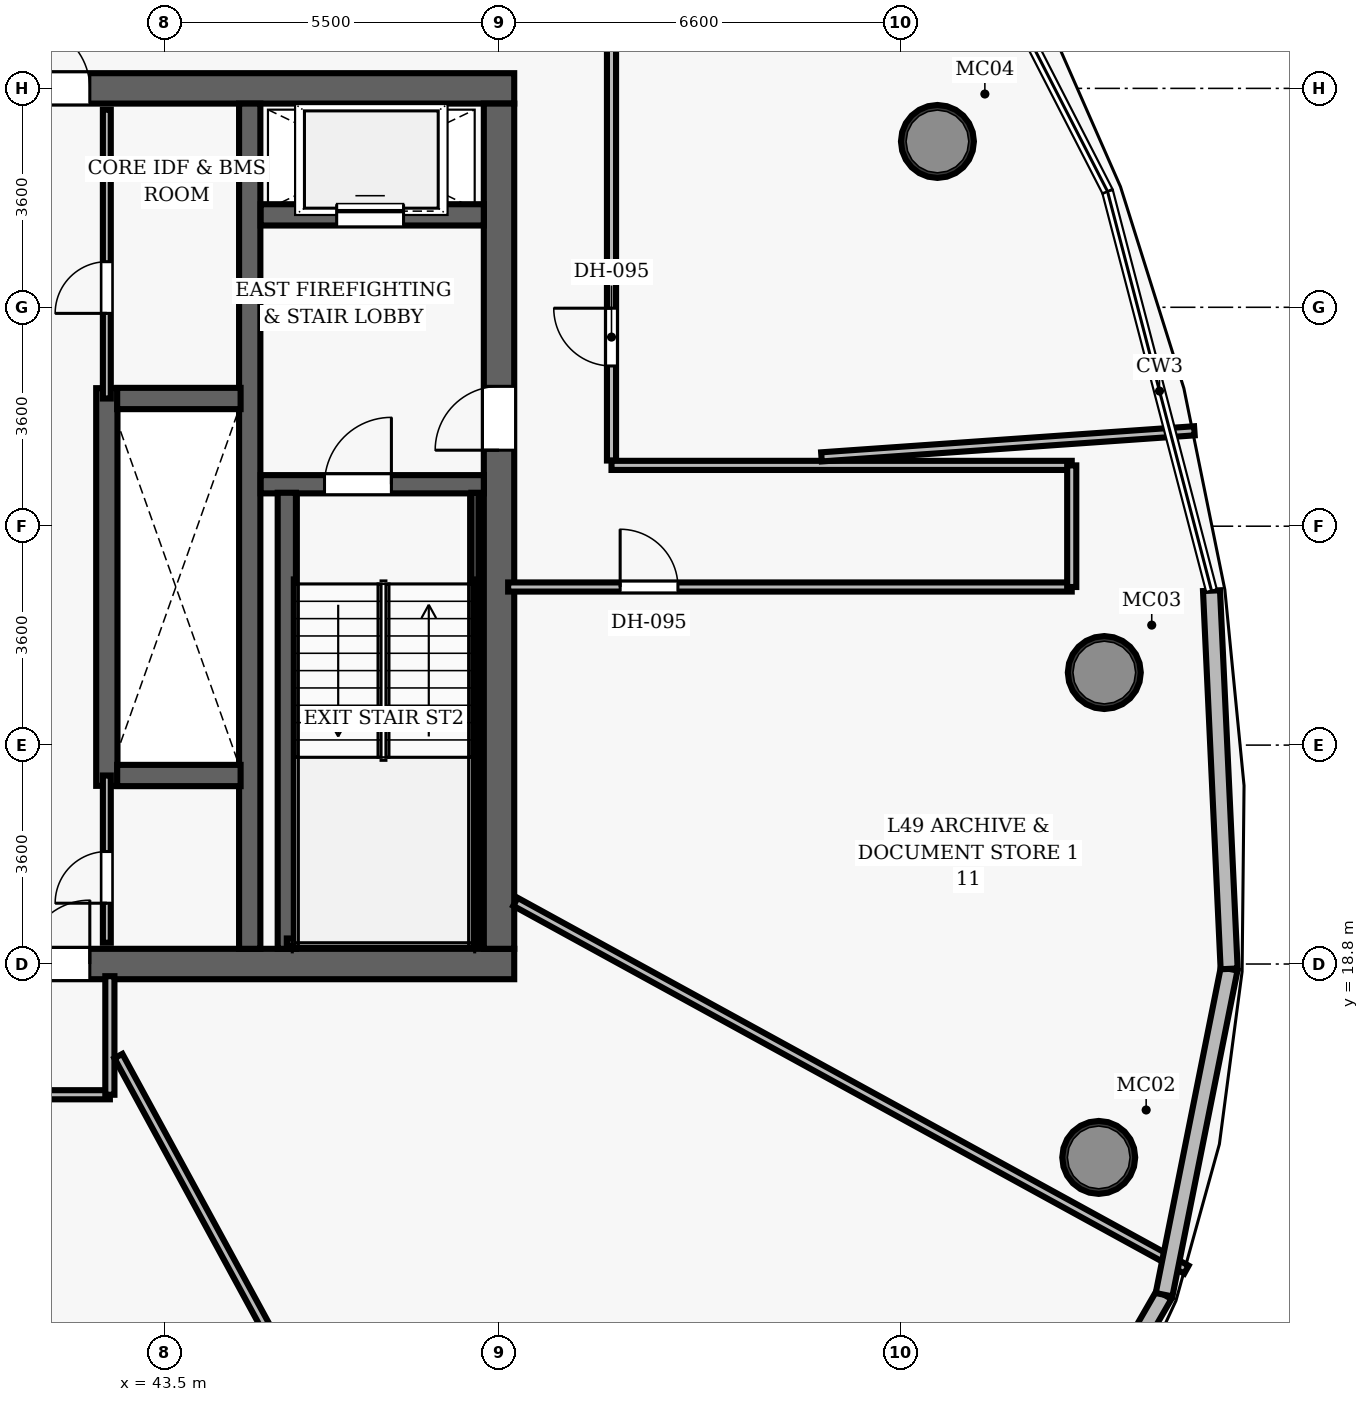
"""IFC4 building model, lengths in metres.
Left out: names, types, materials, properties, quantities, classifications, styles, units other than length and angle.
Written with IfcOpenShell. Run it as: python <this file> out.ifc"""

import sys

from ifc_helpers import new_model, si_unit, direction, frame, frame_2d, origin, origin_2d, place, context, subcontext, project, spatial, rectangle, hollow_circle, extrude, element, fill, save


model = new_model("IFC4")
c1 = context("Model", 3, precision=1e-05, world=origin(), true_north=direction((0.0, 1.0)))
c2 = subcontext(c1, "Body", "Model", "MODEL_VIEW")
j1 = project(units=[si_unit("LENGTHUNIT", "METRE"), si_unit("PLANEANGLEUNIT", "RADIAN")], contexts=[c1])
p1 = place(None, origin())
s1 = spatial("IfcSite", under=j1, at=p1, CompositionType="ELEMENT")
p2 = place(p1, origin())
s2 = spatial("IfcBuilding", under=s1, at=p2, CompositionType="ELEMENT")
p3 = place(p2, frame((0.0, 0.0, 194.3)))
s3 = spatial("IfcBuildingStorey", under=s2, at=p3, CompositionType="ELEMENT", Elevation=194.3)
p4 = place(p3, frame((26.75, 18.8, 0.0), z_axis=(0.0, 0.0, 1.0), x_axis=(1.0, 0.0, 0.0)))
e1 = element("IfcWall", 1, at=p4, inside=s3, PredefinedType="SHEAR", context=c2, shape_type="SweptSolid", body=[
    extrude(rectangle(XDim=22.5, YDim=0.5, at=frame_2d((11.25, 0.0))), origin(), (0.0, 0.0, 1.0), 3.85),
])
p5 = place(p4, frame((14.47, 0.0, 0.0)))
e2 = element("IfcOpeningElement", 2, at=p5, cuts=e1, PredefinedType="OPENING", context=c2, shape_type="SweptSolid", body=[
    extrude(rectangle(XDim=1.05, YDim=2.15, at=frame_2d((0.525, 1.075))), frame((0.0, 0.26, 0.0), z_axis=(0.0, -1.0, 0.0), x_axis=(1.0, 0.0, 0.0)), (0.0, 0.0, 1.0), 0.52),
])
p6 = place(p3, frame((26.75, 33.2, 0.0), z_axis=(0.0, 0.0, 1.0), x_axis=(1.0, 0.0, 0.0)))
e3 = element("IfcWall", 3, at=p6, inside=s3, PredefinedType="SHEAR", context=c2, shape_type="SweptSolid", body=[
    extrude(rectangle(XDim=22.5, YDim=0.5, at=frame_2d((11.25, 0.0))), origin(), (0.0, 0.0, 1.0), 3.85),
])
p7 = place(p6, frame((4.57, 0.0, 0.0)))
e4 = element("IfcOpeningElement", 4, at=p7, cuts=e3, PredefinedType="OPENING", context=c2, shape_type="SweptSolid", body=[
    extrude(rectangle(XDim=1.05, YDim=2.15, at=frame_2d((0.525, 1.075))), frame((0.0, 0.26, 0.0), z_axis=(0.0, -1.0, 0.0), x_axis=(1.0, 0.0, 0.0)), (0.0, 0.0, 1.0), 0.52),
])
p8 = place(p6, frame((14.47, 0.0, 0.0)))
e5 = element("IfcOpeningElement", 5, at=p8, cuts=e3, PredefinedType="OPENING", context=c2, shape_type="SweptSolid", body=[
    extrude(rectangle(XDim=1.05, YDim=2.15, at=frame_2d((0.525, 1.075))), frame((0.0, 0.26, 0.0), z_axis=(0.0, -1.0, 0.0), x_axis=(1.0, 0.0, 0.0)), (0.0, 0.0, 1.0), 0.52),
])
p9 = place(p3, frame((49.0, 19.05, 0.0), z_axis=(0.0, 0.0, 1.0), x_axis=(0.0, 1.0, 0.0)))
e6 = element("IfcWall", 6, at=p9, inside=s3, PredefinedType="SHEAR", context=c2, shape_type="SweptSolid", body=[
    extrude(rectangle(XDim=13.9, YDim=0.5, at=frame_2d((6.95, 0.0))), origin(), (0.0, 0.0, 1.0), 3.85),
])
p10 = place(p9, frame((8.2, 0.0, 0.0)))
e7 = element("IfcOpeningElement", 7, at=p10, cuts=e6, PredefinedType="OPENING", context=c2, shape_type="SweptSolid", body=[
    extrude(rectangle(XDim=1.05, YDim=2.15, at=frame_2d((0.525, 1.075))), frame((0.0, 0.26, 0.0), z_axis=(0.0, -1.0, 0.0), x_axis=(1.0, 0.0, 0.0)), (0.0, 0.0, 1.0), 0.52),
])
p11 = place(p3, frame((44.9, 19.05, 0.0), z_axis=(0.0, 0.0, 1.0), x_axis=(0.0, 1.0, 0.0)))
e8 = element("IfcWall", 8, at=p11, inside=s3, PredefinedType="SHEAR", context=c2, shape_type="SweptSolid", body=[
    extrude(rectangle(XDim=13.9, YDim=0.35, at=frame_2d((6.95, 0.0))), origin(), (0.0, 0.0, 1.0), 3.85),
])
for number, where, z_axis, x_axis in (
    (9, (58.863, 15.619, 0.0), (0.0, 0.0, 1.0), (1.0, 0.0, 0.0)),
    (10, (58.955, 23.594, 0.0), (0.0, 0.0, 1.0), (1.0, 0.0, 0.0)),
    (11, (56.21, 32.327, 0.0), (0.0, 0.0, 1.0), (1.0, 0.0, 0.0)),
):
    element("IfcColumn", number, at=place(p3, frame(where, z_axis=z_axis, x_axis=x_axis)), inside=s3, PredefinedType="COLUMN", context=c2, shape_type="SweptSolid", body=[
        extrude(hollow_circle(Radius=0.6, WallThickness=0.05, at=origin_2d()), origin(), (0.0, 0.0, 1.0), 3.85),
    ])
p12 = place(p3, frame((45.08, 26.69, 0.0), z_axis=(0.0, 0.0, 1.0), x_axis=(1.0, 0.0, 0.0)))
e12 = element("IfcWall", 12, at=p12, inside=s3, PredefinedType="SHEAR", context=c2, shape_type="SweptSolid", body=[
    extrude(rectangle(XDim=3.67, YDim=0.3, at=frame_2d((1.835, 0.0))), origin(), (0.0, 0.0, 1.0), 3.85),
])
p13 = place(p12, frame((1.05, 0.0, 0.0)))
e13 = element("IfcOpeningElement", 13, at=p13, cuts=e12, PredefinedType="OPENING", context=c2, shape_type="SweptSolid", body=[
    extrude(rectangle(XDim=1.1, YDim=2.15, at=frame_2d((0.55, 1.075))), frame((0.0, 0.16, 0.0), z_axis=(0.0, -1.0, 0.0), x_axis=(1.0, 0.0, 0.0)), (0.0, 0.0, 1.0), 0.32),
])
p14 = place(p3, frame((45.51, 19.05, 0.0), z_axis=(0.0, 0.0, 1.0), x_axis=(0.0, 1.0, 0.0)))
e14 = element("IfcWall", 14, at=p14, inside=s3, PredefinedType="SHEAR", context=c2, shape_type="SweptSolid", body=[
    extrude(rectangle(XDim=7.5, YDim=0.3, at=frame_2d((3.75, 0.0))), origin(), (0.0, 0.0, 1.0), 3.85),
])
p15 = place(p3, frame((48.605, 19.1, 0.0), z_axis=(0.0, 0.0, 1.0), x_axis=(0.0, 1.0, 0.0)))
e15 = element("IfcWall", 15, at=p15, inside=s3, PredefinedType="SHEAR", context=c2, shape_type="SweptSolid", body=[
    extrude(rectangle(XDim=7.45, YDim=0.12, at=frame_2d((3.725, 0.0))), origin(), (0.0, 0.0, 1.0), 3.85),
])
p16 = place(p3, frame((45.51, 19.16, 0.0), z_axis=(0.0, 0.0, 1.0), x_axis=(1.0, 0.0, 0.0)))
e16 = element("IfcWall", 16, at=p16, inside=s3, PredefinedType="SHEAR", context=c2, shape_type="SweptSolid", body=[
    extrude(rectangle(XDim=3.095, YDim=0.12, at=frame_2d((1.547, 0.0))), origin(), (0.0, 0.0, 1.0), 3.85),
])
p17 = place(p3, frame((45.08, 31.12, 0.0), z_axis=(0.0, 0.0, 1.0), x_axis=(1.0, 0.0, 0.0)))
e17 = element("IfcWall", 17, at=p17, inside=s3, PredefinedType="SHEAR", context=c2, shape_type="SweptSolid", body=[
    extrude(rectangle(XDim=3.67, YDim=0.35, at=frame_2d((1.835, 0.0))), origin(), (0.0, 0.0, 1.0), 3.035),
])
p18 = place(p17, frame((1.25, 0.0, 0.0)))
e18 = element("IfcOpeningElement", 18, at=p18, cuts=e17, PredefinedType="OPENING", context=c2, shape_type="SweptSolid", body=[
    extrude(rectangle(XDim=1.1, YDim=2.15, at=frame_2d((0.55, 1.075))), frame((0.0, 0.185, 0.0), z_axis=(0.0, -1.0, 0.0), x_axis=(1.0, 0.0, 0.0)), (0.0, 0.0, 1.0), 0.37),
])
p19 = place(p3, frame((42.55, 21.73, 0.0), z_axis=(0.0, 0.0, 1.0), x_axis=(0.0, 1.0, 0.0)))
e19 = element("IfcWall", 19, at=p19, inside=s3, PredefinedType="SHEAR", context=c2, shape_type="SweptSolid", body=[
    extrude(rectangle(XDim=6.54, YDim=0.35, at=frame_2d((3.27, 0.0))), origin(), (0.0, 0.0, 1.0), 3.035),
])
for number, where, z_axis, x_axis in (
    (20, (42.72, 21.9, 0.0), (0.0, 0.0, 1.0), (1.0, 0.0, 0.0)),
    (21, (42.72, 28.1, 0.0), (0.0, 0.0, 1.0), (1.0, 0.0, 0.0)),
):
    element("IfcWall", number, at=place(p3, frame(where, z_axis=z_axis, x_axis=x_axis)), inside=s3, PredefinedType="SHEAR", context=c2, shape_type="SweptSolid", body=[
        extrude(rectangle(XDim=2.03, YDim=0.35, at=frame_2d((1.015, 0.0))), origin(), (0.0, 0.0, 1.0), 3.035),
    ])
p20 = place(p3, frame((42.55, 28.1, 0.0), z_axis=(0.0, 0.0, 1.0), x_axis=(0.0, 1.0, 0.0)))
e22 = element("IfcWall", 22, at=p20, inside=s3, PredefinedType="PARTITIONING", context=c2, shape_type="SweptSolid", body=[
    extrude(rectangle(XDim=4.75, YDim=0.13, at=frame_2d((2.375, 0.0))), origin(), (0.0, 0.0, 1.0), 3.035),
])
p21 = place(p20, frame((1.4, 0.0, 0.0)))
e23 = element("IfcOpeningElement", 23, at=p21, cuts=e22, PredefinedType="OPENING", context=c2, shape_type="SweptSolid", body=[
    extrude(rectangle(XDim=0.85, YDim=2.1, at=frame_2d((0.425, 1.05))), frame((0.0, 0.075, 0.0), z_axis=(0.0, -1.0, 0.0), x_axis=(1.0, 0.0, 0.0)), (0.0, 0.0, 1.0), 0.15),
])
p22 = place(p3, frame((42.55, 19.15, 0.0), z_axis=(0.0, 0.0, 1.0), x_axis=(0.0, 1.0, 0.0)))
e24 = element("IfcWall", 24, at=p22, inside=s3, PredefinedType="PARTITIONING", context=c2, shape_type="SweptSolid", body=[
    extrude(rectangle(XDim=2.75, YDim=0.13, at=frame_2d((1.375, 0.0))), origin(), (0.0, 0.0, 1.0), 3.035),
])
p23 = place(p22, frame((0.65, 0.0, 0.0)))
e25 = element("IfcOpeningElement", 25, at=p23, cuts=e24, PredefinedType="OPENING", context=c2, shape_type="SweptSolid", body=[
    extrude(rectangle(XDim=0.85, YDim=2.1, at=frame_2d((0.425, 1.05))), frame((0.0, 0.075, 0.0), z_axis=(0.0, -1.0, 0.0), x_axis=(1.0, 0.0, 0.0)), (0.0, 0.0, 1.0), 0.15),
])
p24 = place(p3, frame((50.85, 27.08, 0.0), z_axis=(0.0, 0.0, 1.0), x_axis=(0.0, 1.0, 0.0)))
e26 = element("IfcWall", 26, at=p24, inside=s3, PredefinedType="PARTITIONING", context=c2, shape_type="SweptSolid", body=[
    extrude(rectangle(XDim=8.12, YDim=0.15, at=frame_2d((4.06, 0.0))), origin(), (0.0, 0.0, 1.0), 3.035),
])
p25 = place(p24, frame((1.555, 0.0, 0.0)))
e27 = element("IfcOpeningElement", 27, at=p25, cuts=e26, PredefinedType="OPENING", context=c2, shape_type="SweptSolid", body=[
    extrude(rectangle(XDim=0.95, YDim=2.15, at=frame_2d((0.475, 1.075))), frame((0.0, 0.085, 0.0), z_axis=(0.0, -1.0, 0.0), x_axis=(1.0, 0.0, 0.0)), (0.0, 0.0, 1.0), 0.17),
])
p26 = place(p3, frame((50.85, 27.0, 0.0), z_axis=(0.0, 0.0, 1.0), x_axis=(1.0, 0.0, 0.0)))
e28 = element("IfcWall", 28, at=p26, inside=s3, PredefinedType="PARTITIONING", context=c2, shape_type="SweptSolid", body=[
    extrude(rectangle(XDim=7.569, YDim=0.15, at=frame_2d((3.785, 0.0))), origin(), (0.0, 0.0, 1.0), 3.035),
])
p27 = place(p3, frame((49.15, 25.0, 0.0), z_axis=(0.0, 0.0, 1.0), x_axis=(1.0, 0.0, 0.0)))
e29 = element("IfcWall", 29, at=p27, inside=s3, PredefinedType="PARTITIONING", context=c2, shape_type="SweptSolid", body=[
    extrude(rectangle(XDim=9.269, YDim=0.15, at=frame_2d((4.635, 0.0))), origin(), (0.0, 0.0, 1.0), 3.035),
])
p28 = place(p27, frame((1.842, 0.0, 0.0)))
e30 = element("IfcOpeningElement", 30, at=p28, cuts=e29, PredefinedType="OPENING", context=c2, shape_type="SweptSolid", body=[
    extrude(rectangle(XDim=0.95, YDim=2.15, at=frame_2d((0.475, 1.075))), frame((0.0, 0.085, 0.0), z_axis=(0.0, -1.0, 0.0), x_axis=(1.0, 0.0, 0.0)), (0.0, 0.0, 1.0), 0.17),
])
p29 = place(p3, frame((58.419, 25.0, 0.0), z_axis=(0.0, 0.0, 1.0), x_axis=(0.0, 1.0, 0.0)))
e31 = element("IfcWall", 31, at=p29, inside=s3, PredefinedType="PARTITIONING", context=c2, shape_type="SweptSolid", body=[
    extrude(rectangle(XDim=2.0, YDim=0.15, at=frame_2d((1.0, 0.0))), origin(), (0.0, 0.0, 1.0), 3.035),
])
p30 = place(p3, frame((39.05, 16.65, 0.0), z_axis=(0.0, 0.0, 1.0), x_axis=(1.0, 0.0, 0.0)))
e32 = element("IfcWall", 32, at=p30, inside=s3, PredefinedType="PARTITIONING", context=c2, shape_type="SweptSolid", body=[
    extrude(rectangle(XDim=3.55, YDim=0.15, at=frame_2d((1.775, 0.0))), origin(), (0.0, 0.0, 1.0), 3.035),
])
p31 = place(p30, frame((0.492, 0.0, 0.0)))
e33 = element("IfcOpeningElement", 33, at=p31, cuts=e32, PredefinedType="OPENING", context=c2, shape_type="SweptSolid", body=[
    extrude(rectangle(XDim=1.5, YDim=2.2, at=frame_2d((0.75, 1.1))), frame((0.0, 0.085, 0.0), z_axis=(0.0, -1.0, 0.0), x_axis=(1.0, 0.0, 0.0)), (0.0, 0.0, 1.0), 0.17),
])
p32 = place(p3, frame((42.6, 16.65, 0.0), z_axis=(0.0, 0.0, 1.0), x_axis=(0.0, 1.0, 0.0)))
e34 = element("IfcWall", 34, at=p32, inside=s3, PredefinedType="PARTITIONING", context=c2, shape_type="SweptSolid", body=[
    extrude(rectangle(XDim=1.95, YDim=0.15, at=frame_2d((0.975, 0.0))), origin(), (0.0, 0.0, 1.0), 3.035),
])
p33 = place(p3, frame((54.303, 27.14, 0.0), z_axis=(0.0, 0.0, 1.0), x_axis=(0.997563418291, 0.069765510725, 0.0)))
e35 = element("IfcWall", 35, at=p33, inside=s3, PredefinedType="PARTITIONING", context=c2, shape_type="SweptSolid", body=[
    extrude(rectangle(XDim=6.148, YDim=0.15, at=frame_2d((3.074, 0.0))), origin(), (0.0, 0.0, 1.0), 3.035),
])
p34 = place(p3, frame((42.74, 17.287, 0.0), z_axis=(0.0, 0.0, 1.0), x_axis=(0.477854270456, -0.87843912493, 0.0)))
e36 = element("IfcWall", 36, at=p34, inside=s3, PredefinedType="PARTITIONING", context=c2, shape_type="SweptSolid", body=[
    extrude(rectangle(XDim=14.695, YDim=0.15, at=frame_2d((7.348, 0.0))), origin(), (0.0, 0.0, 1.0), 3.035),
])
p35 = place(p3, frame((49.27, 19.823, 0.0), z_axis=(0.0, 0.0, 1.0), x_axis=(0.876915815603, -0.480643997513, 0.0)))
e37 = element("IfcWall", 37, at=p35, inside=s3, PredefinedType="PARTITIONING", context=c2, shape_type="SweptSolid", body=[
    extrude(rectangle(XDim=12.584, YDim=0.15, at=frame_2d((6.292, 0.0))), origin(), (0.0, 0.0, 1.0), 3.035),
])
p36 = place(p3, frame((59.938, 13.362, 0.0), z_axis=(0.0, 0.0, 1.0), x_axis=(-0.499747013388, -0.866171416412, 0.0)))
e38 = element("IfcWall", 38, at=p36, inside=s3, PredefinedType="SOLIDWALL", context=c2, shape_type="SweptSolid", body=[
    extrude(rectangle(XDim=4.876, YDim=0.28, at=frame_2d((2.438, 0.0))), origin(), (0.0, 0.0, 1.0), 3.62),
])
p37 = place(p3, frame((61.008, 18.72, 0.0), z_axis=(0.0, 0.0, 1.0), x_axis=(-0.195866964802, -0.980630476836, 0.0)))
e39 = element("IfcWall", 39, at=p37, inside=s3, PredefinedType="SOLIDWALL", context=c2, shape_type="SweptSolid", body=[
    extrude(rectangle(XDim=5.465, YDim=0.28, at=frame_2d((2.732, 0.0))), origin(), (0.0, 0.0, 1.0), 3.62),
])
p38 = place(p3, frame((60.718, 24.94, 0.0), z_axis=(0.0, 0.0, 1.0), x_axis=(0.046583329384, -0.998914407456, 0.0)))
e40 = element("IfcWall", 40, at=p38, inside=s3, PredefinedType="SOLIDWALL", context=c2, shape_type="SweptSolid", body=[
    extrude(rectangle(XDim=6.226, YDim=0.28, at=frame_2d((3.113, 0.0))), origin(), (0.0, 0.0, 1.0), 3.62),
])
p39 = place(p13, origin())
e41 = element("IfcDoor", 41, at=p39, inside=s3, OperationType="SINGLE_SWING_RIGHT", PredefinedType="DOOR", context=c2, shape_type="SweptSolid", body=[
    extrude(rectangle(XDim=1.1, YDim=2.15, at=frame_2d((0.55, 1.075))), frame((0.0, 0.025, 0.0), z_axis=(0.0, -1.0, 0.0), x_axis=(1.0, 0.0, 0.0)), (0.0, 0.0, 1.0), 0.05),
])
fill(e13, e41)
p40 = place(p10, origin())
e42 = element("IfcDoor", 42, at=p40, inside=s3, OperationType="SINGLE_SWING_LEFT", PredefinedType="DOOR", context=c2, shape_type="SweptSolid", body=[
    extrude(rectangle(XDim=1.05, YDim=2.15, at=frame_2d((0.525, 1.075))), frame((0.0, 0.025, 0.0), z_axis=(0.0, -1.0, 0.0), x_axis=(1.0, 0.0, 0.0)), (0.0, 0.0, 1.0), 0.05),
])
fill(e7, e42)
p41 = place(p8, origin())
e43 = element("IfcDoor", 43, at=p41, inside=s3, OperationType="SINGLE_SWING_LEFT", PredefinedType="DOOR", context=c2, shape_type="SweptSolid", body=[
    extrude(rectangle(XDim=1.05, YDim=2.15, at=frame_2d((0.525, 1.075))), frame((0.0, 0.025, 0.0), z_axis=(0.0, -1.0, 0.0), x_axis=(1.0, 0.0, 0.0)), (0.0, 0.0, 1.0), 0.05),
])
fill(e5, e43)
p42 = place(p5, origin())
e44 = element("IfcDoor", 44, at=p42, inside=s3, OperationType="SINGLE_SWING_RIGHT", PredefinedType="DOOR", context=c2, shape_type="SweptSolid", body=[
    extrude(rectangle(XDim=1.05, YDim=2.15, at=frame_2d((0.525, 1.075))), frame((0.0, 0.025, 0.0), z_axis=(0.0, -1.0, 0.0), x_axis=(1.0, 0.0, 0.0)), (0.0, 0.0, 1.0), 0.05),
])
fill(e2, e44)
p43 = place(p21, origin())
e45 = element("IfcDoor", 45, at=p43, inside=s3, OperationType="SINGLE_SWING_LEFT", PredefinedType="DOOR", context=c2, shape_type="SweptSolid", body=[
    extrude(rectangle(XDim=0.85, YDim=2.1, at=frame_2d((0.425, 1.05))), frame((0.0, 0.025, 0.0), z_axis=(0.0, -1.0, 0.0), x_axis=(1.0, 0.0, 0.0)), (0.0, 0.0, 1.0), 0.05),
])
fill(e23, e45)
p44 = place(p23, origin())
e46 = element("IfcDoor", 46, at=p44, inside=s3, OperationType="SINGLE_SWING_LEFT", PredefinedType="DOOR", context=c2, shape_type="SweptSolid", body=[
    extrude(rectangle(XDim=0.85, YDim=2.1, at=frame_2d((0.425, 1.05))), frame((0.0, 0.025, 0.0), z_axis=(0.0, -1.0, 0.0), x_axis=(1.0, 0.0, 0.0)), (0.0, 0.0, 1.0), 0.05),
])
fill(e25, e46)
p45 = place(p25, origin())
e47 = element("IfcDoor", 47, at=p45, inside=s3, OperationType="SINGLE_SWING_RIGHT", PredefinedType="DOOR", context=c2, shape_type="SweptSolid", body=[
    extrude(rectangle(XDim=0.95, YDim=2.15, at=frame_2d((0.475, 1.075))), frame((0.0, 0.025, 0.0), z_axis=(0.0, -1.0, 0.0), x_axis=(1.0, 0.0, 0.0)), (0.0, 0.0, 1.0), 0.05),
])
fill(e27, e47)
p46 = place(p28, origin())
e48 = element("IfcDoor", 48, at=p46, inside=s3, OperationType="SINGLE_SWING_LEFT", PredefinedType="DOOR", context=c2, shape_type="SweptSolid", body=[
    extrude(rectangle(XDim=0.95, YDim=2.15, at=frame_2d((0.475, 1.075))), frame((0.0, 0.025, 0.0), z_axis=(0.0, -1.0, 0.0), x_axis=(1.0, 0.0, 0.0)), (0.0, 0.0, 1.0), 0.05),
])
fill(e30, e48)
p47 = place(p18, origin())
e49 = element("IfcDoor", 49, at=p47, inside=s3, OperationType="SLIDING_TO_LEFT", PredefinedType="DOOR", context=c2, shape_type="SweptSolid", body=[
    extrude(rectangle(XDim=1.1, YDim=2.15, at=frame_2d((0.55, 1.075))), frame((0.0, 0.025, 0.0), z_axis=(0.0, -1.0, 0.0), x_axis=(1.0, 0.0, 0.0)), (0.0, 0.0, 1.0), 0.05),
])
fill(e18, e49)
save(model, sys.argv[1])
